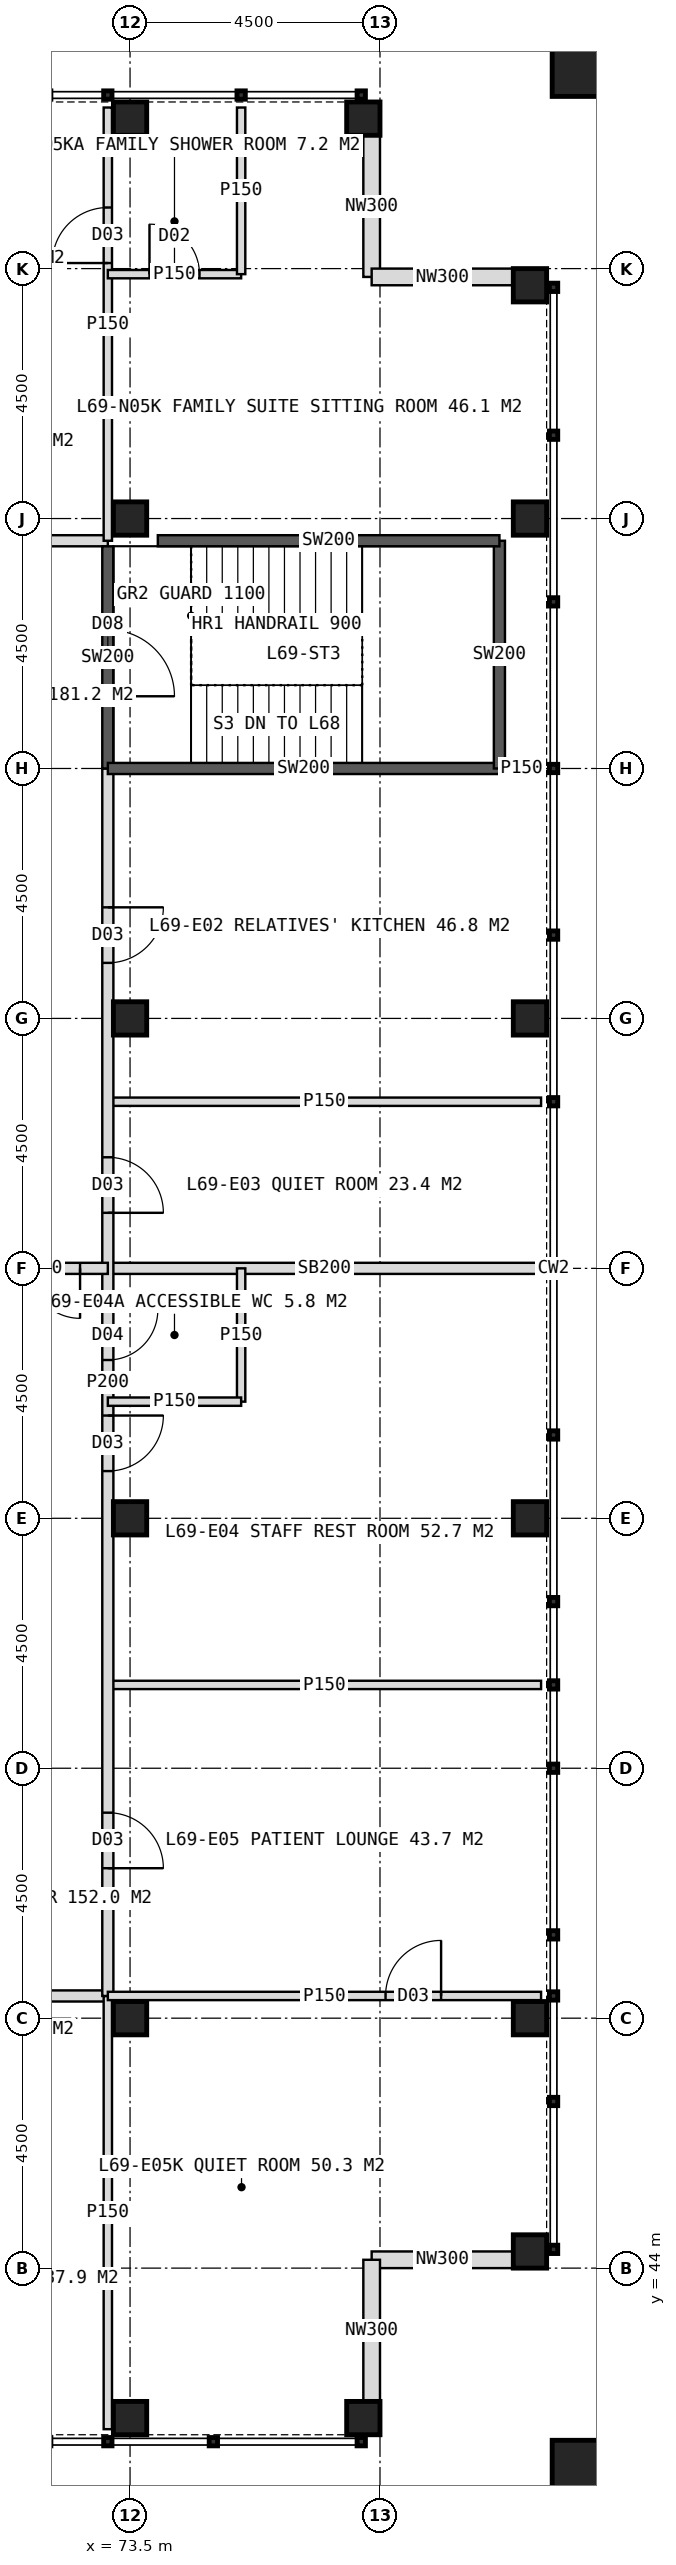
"""IFC4 building model, lengths in metres.
Left out: names, types, materials, properties, quantities, classifications, styles, units other than length and angle.
Written with IfcOpenShell. Run it as: python <this file> out.ifc"""

import sys

from ifc_helpers import new_model, si_unit, direction, frame, frame_2d, origin, origin_2d, place, context, subcontext, project, spatial, rectangle, hollow_rectangle, extrude, element, fill, save


model = new_model("IFC4")
c1 = context("Model", 3, precision=1e-05, world=origin(), true_north=direction((0.0, 1.0)))
c2 = subcontext(c1, "Body", "Model", "MODEL_VIEW")
j1 = project(units=[si_unit("LENGTHUNIT", "METRE"), si_unit("PLANEANGLEUNIT", "RADIAN")], contexts=[c1])
p1 = place(None, origin())
s1 = spatial("IfcSite", under=j1, at=p1, CompositionType="ELEMENT")
p2 = place(p1, origin())
s2 = spatial("IfcBuilding", under=s1, at=p2, CompositionType="ELEMENT")
p3 = place(p2, frame((0.0, 0.0, 286.0)))
s3 = spatial("IfcBuildingStorey", under=s2, at=p3, CompositionType="ELEMENT", Elevation=286.0)
for number, where, z_axis, x_axis in (
    (1, (73.5, 48.5, 0.0), (0.0, 0.0, 1.0), (1.0, 0.0, 0.0)),
    (2, (73.5, 75.5, 0.0), (0.0, 0.0, 1.0), (1.0, 0.0, 0.0)),
    (3, (73.5, 57.5, 0.0), (0.0, 0.0, 1.0), (1.0, 0.0, 0.0)),
    (4, (73.5, 66.5, 0.0), (0.0, 0.0, 1.0), (1.0, 0.0, 0.0)),
    (5, (80.7, 44.3, 0.0), (0.0, 0.0, 1.0), (1.0, 0.0, 0.0)),
    (6, (80.7, 48.5, 0.0), (0.0, 0.0, 1.0), (1.0, 0.0, 0.0)),
    (7, (80.7, 57.5, 0.0), (0.0, 0.0, 1.0), (1.0, 0.0, 0.0)),
    (8, (80.7, 66.5, 0.0), (0.0, 0.0, 1.0), (1.0, 0.0, 0.0)),
    (9, (73.5, 41.3, 0.0), (0.0, 0.0, 1.0), (1.0, 0.0, 0.0)),
    (10, (73.5, 82.7, 0.0), (0.0, 0.0, 1.0), (1.0, 0.0, 0.0)),
    (11, (80.7, 75.5, 0.0), (0.0, 0.0, 1.0), (1.0, 0.0, 0.0)),
    (12, (77.7, 41.3, 0.0), (0.0, 0.0, 1.0), (1.0, 0.0, 0.0)),
    (13, (77.7, 82.7, 0.0), (0.0, 0.0, 1.0), (1.0, 0.0, 0.0)),
    (14, (80.7, 79.7, 0.0), (0.0, 0.0, 1.0), (1.0, 0.0, 0.0)),
):
    element("IfcColumn", number, at=place(p3, frame(where, z_axis=z_axis, x_axis=x_axis)), inside=s3, PredefinedType="COLUMN", context=c2, shape_type="SweptSolid", body=[
        extrude(hollow_rectangle(XDim=0.6, YDim=0.6, WallThickness=0.04, at=origin_2d()), origin(), (0.0, 0.0, 1.0), 4.0),
    ])
for number, where, z_axis, x_axis in (
    (15, (81.6, 40.4, 0.0), (0.0, 0.0, 1.0), (1.0, 0.0, 0.0)),
    (16, (81.6, 83.6, 0.0), (0.0, 0.0, 1.0), (1.0, 0.0, 0.0)),
):
    element("IfcColumn", number, at=place(p3, frame(where, z_axis=z_axis, x_axis=x_axis)), inside=s3, PredefinedType="COLUMN", context=c2, shape_type="SweptSolid", body=[
        extrude(hollow_rectangle(XDim=1.0, YDim=1.0, WallThickness=0.06, at=origin_2d()), origin(), (0.0, 0.0, 1.0), 4.0),
    ])
for number, where, z_axis, x_axis in (
    (17, (77.85, 82.4, 0.0), (0.0, 0.0, 1.0), (0.0, -1.0, 0.0)),
    (18, (77.85, 79.85, 0.0), (0.0, 0.0, 1.0), (1.0, 0.0, 0.0)),
    (19, (80.4, 44.15, 0.0), (0.0, 0.0, 1.0), (-1.0, 0.0, 0.0)),
    (20, (77.85, 44.15, 0.0), (0.0, 0.0, 1.0), (0.0, -1.0, 0.0)),
):
    element("IfcWall", number, at=place(p3, frame(where, z_axis=z_axis, x_axis=x_axis)), inside=s3, PredefinedType="ELEMENTEDWALL", context=c2, shape_type="SweptSolid", body=[
        extrude(rectangle(XDim=2.55, YDim=0.3, at=frame_2d((1.275, 0.0))), origin(), (0.0, 0.0, 1.0), 2.95),
    ])
p4 = place(p3, frame((46.9, 75.1, 0.0), z_axis=(0.0, 0.0, 1.0), x_axis=(1.0, 0.0, 0.0)))
e21 = element("IfcWall", 21, at=p4, inside=s3, PredefinedType="PARTITIONING", context=c2, shape_type="SweptSolid", body=[
    extrude(rectangle(XDim=26.2, YDim=0.2, at=frame_2d((13.1, 0.0))), origin(), (0.0, 0.0, 1.0), 3.75),
])
p5 = place(p4, frame((1.55, 0.0, 0.0)))
e22 = element("IfcOpeningElement", 22, at=p5, cuts=e21, PredefinedType="OPENING", context=c2, shape_type="SweptSolid", body=[
    extrude(rectangle(XDim=1.0, YDim=2.1, at=frame_2d((0.5, 1.05))), frame((0.0, 0.11, 0.0), z_axis=(0.0, -1.0, 0.0), x_axis=(1.0, 0.0, 0.0)), (0.0, 0.0, 1.0), 0.22),
])
p6 = place(p4, frame((6.75, 0.0, 0.0)))
e23 = element("IfcOpeningElement", 23, at=p6, cuts=e21, PredefinedType="OPENING", context=c2, shape_type="SweptSolid", body=[
    extrude(rectangle(XDim=1.0, YDim=2.1, at=frame_2d((0.5, 1.05))), frame((0.0, 0.11, 0.0), z_axis=(0.0, -1.0, 0.0), x_axis=(1.0, 0.0, 0.0)), (0.0, 0.0, 1.0), 0.22),
])
p7 = place(p4, frame((14.25, 0.0, 0.0)))
e24 = element("IfcOpeningElement", 24, at=p7, cuts=e21, PredefinedType="OPENING", context=c2, shape_type="SweptSolid", body=[
    extrude(rectangle(XDim=1.2, YDim=2.2, at=frame_2d((0.6, 1.1))), frame((0.0, 0.11, 0.0), z_axis=(0.0, -1.0, 0.0), x_axis=(1.0, 0.0, 0.0)), (0.0, 0.0, 1.0), 0.22),
])
p8 = place(p4, frame((18.45, 0.0, 0.0)))
e25 = element("IfcOpeningElement", 25, at=p8, cuts=e21, PredefinedType="OPENING", context=c2, shape_type="SweptSolid", body=[
    extrude(rectangle(XDim=1.0, YDim=2.1, at=frame_2d((0.5, 1.05))), frame((0.0, 0.11, 0.0), z_axis=(0.0, -1.0, 0.0), x_axis=(1.0, 0.0, 0.0)), (0.0, 0.0, 1.0), 0.22),
])
p9 = place(p4, frame((23.25, 0.0, 0.0)))
e26 = element("IfcOpeningElement", 26, at=p9, cuts=e21, PredefinedType="OPENING", context=c2, shape_type="SweptSolid", body=[
    extrude(rectangle(XDim=1.2, YDim=2.2, at=frame_2d((0.6, 1.1))), frame((0.0, 0.11, 0.0), z_axis=(0.0, -1.0, 0.0), x_axis=(1.0, 0.0, 0.0)), (0.0, 0.0, 1.0), 0.22),
])
p10 = place(p3, frame((73.1, 75.1, 0.0), z_axis=(0.0, 0.0, 1.0), x_axis=(0.0, 1.0, 0.0)))
e27 = element("IfcWall", 27, at=p10, inside=s3, PredefinedType="PARTITIONING", context=c2, shape_type="SweptSolid", body=[
    extrude(rectangle(XDim=7.8, YDim=0.15, at=frame_2d((3.9, 0.0))), origin(), (0.0, 0.0, 1.0), 3.75),
])
p11 = place(p10, frame((5.0, 0.0, 0.0)))
e28 = element("IfcOpeningElement", 28, at=p11, cuts=e27, PredefinedType="OPENING", context=c2, shape_type="SweptSolid", body=[
    extrude(rectangle(XDim=1.0, YDim=2.1, at=frame_2d((0.5, 1.05))), frame((0.0, 0.085, 0.0), z_axis=(0.0, -1.0, 0.0), x_axis=(1.0, 0.0, 0.0)), (0.0, 0.0, 1.0), 0.17),
])
p12 = place(p3, frame((73.1, 79.9, 0.0), z_axis=(0.0, 0.0, 1.0), x_axis=(1.0, 0.0, 0.0)))
e29 = element("IfcWall", 29, at=p12, inside=s3, PredefinedType="PARTITIONING", context=c2, shape_type="SweptSolid", body=[
    extrude(rectangle(XDim=2.4, YDim=0.15, at=frame_2d((1.2, 0.0))), origin(), (0.0, 0.0, 1.0), 3.75),
])
p13 = place(p12, frame((0.75, 0.0, 0.0)))
e30 = element("IfcOpeningElement", 30, at=p13, cuts=e29, PredefinedType="OPENING", context=c2, shape_type="SweptSolid", body=[
    extrude(rectangle(XDim=0.9, YDim=2.1, at=frame_2d((0.45, 1.05))), frame((0.0, 0.085, 0.0), z_axis=(0.0, -1.0, 0.0), x_axis=(1.0, 0.0, 0.0)), (0.0, 0.0, 1.0), 0.17),
])
p14 = place(p3, frame((75.5, 79.9, 0.0), z_axis=(0.0, 0.0, 1.0), x_axis=(0.0, 1.0, 0.0)))
e31 = element("IfcWall", 31, at=p14, inside=s3, PredefinedType="PARTITIONING", context=c2, shape_type="SweptSolid", body=[
    extrude(rectangle(XDim=3.0, YDim=0.15, at=frame_2d((1.5, 0.0))), origin(), (0.0, 0.0, 1.0), 3.75),
])
p15 = place(p3, frame((73.1, 48.9, 0.0), z_axis=(0.0, 0.0, 1.0), x_axis=(-1.0, 0.0, 0.0)))
e32 = element("IfcWall", 32, at=p15, inside=s3, PredefinedType="PARTITIONING", context=c2, shape_type="SweptSolid", body=[
    extrude(rectangle(XDim=26.2, YDim=0.2, at=frame_2d((13.1, 0.0))), origin(), (0.0, 0.0, 1.0), 3.75),
])
p16 = place(p15, frame((1.75, 0.0, 0.0)))
e33 = element("IfcOpeningElement", 33, at=p16, cuts=e32, PredefinedType="OPENING", context=c2, shape_type="SweptSolid", body=[
    extrude(rectangle(XDim=1.2, YDim=2.2, at=frame_2d((0.6, 1.1))), frame((0.0, 0.11, 0.0), z_axis=(0.0, -1.0, 0.0), x_axis=(1.0, 0.0, 0.0)), (0.0, 0.0, 1.0), 0.22),
])
p17 = place(p15, frame((6.75, 0.0, 0.0)))
e34 = element("IfcOpeningElement", 34, at=p17, cuts=e32, PredefinedType="OPENING", context=c2, shape_type="SweptSolid", body=[
    extrude(rectangle(XDim=1.0, YDim=2.1, at=frame_2d((0.5, 1.05))), frame((0.0, 0.11, 0.0), z_axis=(0.0, -1.0, 0.0), x_axis=(1.0, 0.0, 0.0)), (0.0, 0.0, 1.0), 0.22),
])
p18 = place(p15, frame((11.85, 0.0, 0.0)))
e35 = element("IfcOpeningElement", 35, at=p18, cuts=e32, PredefinedType="OPENING", context=c2, shape_type="SweptSolid", body=[
    extrude(rectangle(XDim=1.0, YDim=2.1, at=frame_2d((0.5, 1.05))), frame((0.0, 0.11, 0.0), z_axis=(0.0, -1.0, 0.0), x_axis=(1.0, 0.0, 0.0)), (0.0, 0.0, 1.0), 0.22),
])
p19 = place(p15, frame((15.75, 0.0, 0.0)))
e36 = element("IfcOpeningElement", 36, at=p19, cuts=e32, PredefinedType="OPENING", context=c2, shape_type="SweptSolid", body=[
    extrude(rectangle(XDim=1.0, YDim=2.1, at=frame_2d((0.5, 1.05))), frame((0.0, 0.11, 0.0), z_axis=(0.0, -1.0, 0.0), x_axis=(1.0, 0.0, 0.0)), (0.0, 0.0, 1.0), 0.22),
])
p20 = place(p15, frame((23.25, 0.0, 0.0)))
e37 = element("IfcOpeningElement", 37, at=p20, cuts=e32, PredefinedType="OPENING", context=c2, shape_type="SweptSolid", body=[
    extrude(rectangle(XDim=1.2, YDim=2.2, at=frame_2d((0.6, 1.1))), frame((0.0, 0.11, 0.0), z_axis=(0.0, -1.0, 0.0), x_axis=(1.0, 0.0, 0.0)), (0.0, 0.0, 1.0), 0.22),
])
p21 = place(p3, frame((73.1, 48.9, 0.0), z_axis=(0.0, 0.0, 1.0), x_axis=(0.0, -1.0, 0.0)))
e38 = element("IfcWall", 38, at=p21, inside=s3, PredefinedType="PARTITIONING", context=c2, shape_type="SweptSolid", body=[
    extrude(rectangle(XDim=7.8, YDim=0.15, at=frame_2d((3.9, 0.0))), origin(), (0.0, 0.0, 1.0), 3.75),
])
p22 = place(p3, frame((80.2, 71.0, 0.0), z_axis=(0.0, 0.0, 1.0), x_axis=(1.0, 0.0, 0.0)))
e39 = element("IfcWall", 39, at=p22, inside=s3, PredefinedType="PARTITIONING", context=c2, shape_type="SweptSolid", body=[
    extrude(rectangle(XDim=0.7, YDim=0.15, at=frame_2d((0.35, 0.0))), origin(), (0.0, 0.0, 1.0), 3.75),
])
p23 = place(p3, frame((73.1, 65.0, 0.0), z_axis=(0.0, 0.0, 1.0), x_axis=(1.0, 0.0, 0.0)))
e40 = element("IfcWall", 40, at=p23, inside=s3, PredefinedType="PARTITIONING", context=c2, shape_type="SweptSolid", body=[
    extrude(rectangle(XDim=7.8, YDim=0.15, at=frame_2d((3.9, 0.0))), origin(), (0.0, 0.0, 1.0), 3.75),
])
p24 = place(p3, frame((73.1, 62.0, 0.0), z_axis=(0.0, 0.0, 1.0), x_axis=(1.0, 0.0, 0.0)))
e41 = element("IfcWall", 41, at=p24, inside=s3, PredefinedType="SOLIDWALL", context=c2, shape_type="SweptSolid", body=[
    extrude(rectangle(XDim=7.8, YDim=0.2, at=frame_2d((3.9, 0.0))), origin(), (0.0, 0.0, 1.0), 2.997),
])
p25 = place(p3, frame((73.1, 54.5, 0.0), z_axis=(0.0, 0.0, 1.0), x_axis=(1.0, 0.0, 0.0)))
e42 = element("IfcWall", 42, at=p25, inside=s3, PredefinedType="PARTITIONING", context=c2, shape_type="SweptSolid", body=[
    extrude(rectangle(XDim=7.8, YDim=0.15, at=frame_2d((3.9, 0.0))), origin(), (0.0, 0.0, 1.0), 3.75),
])
p26 = place(p3, frame((73.1, 71.0, 0.0), z_axis=(0.0, 0.0, 1.0), x_axis=(0.0, -1.0, 0.0)))
e43 = element("IfcWall", 43, at=p26, inside=s3, PredefinedType="PARTITIONING", context=c2, shape_type="SweptSolid", body=[
    extrude(rectangle(XDim=22.1, YDim=0.2, at=frame_2d((11.05, 0.0))), origin(), (0.0, 0.0, 1.0), 3.75),
])
p27 = place(p26, frame((2.5, 0.0, 0.0)))
e44 = element("IfcOpeningElement", 44, at=p27, cuts=e43, PredefinedType="OPENING", context=c2, shape_type="SweptSolid", body=[
    extrude(rectangle(XDim=1.0, YDim=2.1, at=frame_2d((0.5, 1.05))), frame((0.0, 0.11, 0.0), z_axis=(0.0, -1.0, 0.0), x_axis=(1.0, 0.0, 0.0)), (0.0, 0.0, 1.0), 0.22),
])
p28 = place(p26, frame((7.0, 0.0, 0.0)))
e45 = element("IfcOpeningElement", 45, at=p28, cuts=e43, PredefinedType="OPENING", context=c2, shape_type="SweptSolid", body=[
    extrude(rectangle(XDim=1.0, YDim=2.1, at=frame_2d((0.5, 1.05))), frame((0.0, 0.11, 0.0), z_axis=(0.0, -1.0, 0.0), x_axis=(1.0, 0.0, 0.0)), (0.0, 0.0, 1.0), 0.22),
])
p29 = place(p26, frame((9.75, 0.0, 0.0)))
e46 = element("IfcOpeningElement", 46, at=p29, cuts=e43, PredefinedType="OPENING", context=c2, shape_type="SweptSolid", body=[
    extrude(rectangle(XDim=0.9, YDim=2.1, at=frame_2d((0.45, 1.05))), frame((0.0, 0.11, 0.0), z_axis=(0.0, -1.0, 0.0), x_axis=(1.0, 0.0, 0.0)), (0.0, 0.0, 1.0), 0.22),
])
p30 = place(p26, frame((11.65, 0.0, 0.0)))
e47 = element("IfcOpeningElement", 47, at=p30, cuts=e43, PredefinedType="OPENING", context=c2, shape_type="SweptSolid", body=[
    extrude(rectangle(XDim=1.0, YDim=2.1, at=frame_2d((0.5, 1.05))), frame((0.0, 0.11, 0.0), z_axis=(0.0, -1.0, 0.0), x_axis=(1.0, 0.0, 0.0)), (0.0, 0.0, 1.0), 0.22),
])
p31 = place(p26, frame((18.8, 0.0, 0.0)))
e48 = element("IfcOpeningElement", 48, at=p31, cuts=e43, PredefinedType="OPENING", context=c2, shape_type="SweptSolid", body=[
    extrude(rectangle(XDim=1.0, YDim=2.1, at=frame_2d((0.5, 1.05))), frame((0.0, 0.11, 0.0), z_axis=(0.0, -1.0, 0.0), x_axis=(1.0, 0.0, 0.0)), (0.0, 0.0, 1.0), 0.22),
])
for number, where, z_axis, x_axis in (
    (49, (75.5, 62.0, 0.0), (0.0, 0.0, 1.0), (0.0, -1.0, 0.0)),
    (50, (73.1, 59.6, 0.0), (0.0, 0.0, 1.0), (1.0, 0.0, 0.0)),
):
    element("IfcWall", number, at=place(p3, frame(where, z_axis=z_axis, x_axis=x_axis)), inside=s3, PredefinedType="PARTITIONING", context=c2, shape_type="SweptSolid", body=[
        extrude(rectangle(XDim=2.4, YDim=0.15, at=frame_2d((1.2, 0.0))), origin(), (0.0, 0.0, 1.0), 3.75),
    ])
p32 = place(p3, frame((73.1, 48.9, 0.0), z_axis=(0.0, 0.0, 1.0), x_axis=(1.0, 0.0, 0.0)))
e51 = element("IfcWall", 51, at=p32, inside=s3, PredefinedType="PARTITIONING", context=c2, shape_type="SweptSolid", body=[
    extrude(rectangle(XDim=7.8, YDim=0.15, at=frame_2d((3.9, 0.0))), origin(), (0.0, 0.0, 1.0), 3.75),
])
p33 = place(p32, frame((5.0, 0.0, 0.0)))
e52 = element("IfcOpeningElement", 52, at=p33, cuts=e51, PredefinedType="OPENING", context=c2, shape_type="SweptSolid", body=[
    extrude(rectangle(XDim=1.0, YDim=2.1, at=frame_2d((0.5, 1.05))), frame((0.0, 0.085, 0.0), z_axis=(0.0, -1.0, 0.0), x_axis=(1.0, 0.0, 0.0)), (0.0, 0.0, 1.0), 0.17),
])
p34 = place(p3, frame((70.5, 62.0, 0.0), z_axis=(0.0, 0.0, 1.0), x_axis=(1.0, 0.0, 0.0)))
e53 = element("IfcWall", 53, at=p34, inside=s3, PredefinedType="SOLIDWALL", context=c2, shape_type="SweptSolid", body=[
    extrude(rectangle(XDim=2.6, YDim=0.2, at=frame_2d((1.3, 0.0))), origin(), (0.0, 0.0, 1.0), 2.997),
])
p35 = place(p34, frame((0.3, 0.0, 0.0)))
e54 = element("IfcOpeningElement", 54, at=p35, cuts=e53, PredefinedType="OPENING", context=c2, shape_type="SweptSolid", body=[
    extrude(rectangle(XDim=1.8, YDim=2.2, at=frame_2d((0.9, 1.1))), frame((0.0, 0.11, 0.0), z_axis=(0.0, -1.0, 0.0), x_axis=(1.0, 0.0, 0.0)), (0.0, 0.0, 1.0), 0.22),
])
p36 = place(p3, frame((73.1, 75.0, 0.0), z_axis=(0.0, 0.0, 1.0), x_axis=(0.0, -1.0, 0.0)))
e55 = element("IfcWall", 55, at=p36, inside=s3, PredefinedType="SOLIDWALL", context=c2, shape_type="SweptSolid", body=[
    extrude(rectangle(XDim=4.0, YDim=0.2, at=frame_2d((2.0, 0.0))), origin(), (0.0, 0.0, 1.0), 3.75),
])
p37 = place(p36, frame((1.5, 0.0, 0.0)))
e56 = element("IfcOpeningElement", 56, at=p37, cuts=e55, PredefinedType="OPENING", context=c2, shape_type="SweptSolid", body=[
    extrude(rectangle(XDim=1.2, YDim=2.1, at=frame_2d((0.6, 1.05))), frame((0.0, 0.11, 0.0), z_axis=(0.0, -1.0, 0.0), x_axis=(1.0, 0.0, 0.0)), (0.0, 0.0, 1.0), 0.22),
])
p38 = place(p3, frame((73.1, 71.0, 0.0), z_axis=(0.0, 0.0, 1.0), x_axis=(1.0, 0.0, 0.0)))
e57 = element("IfcWall", 57, at=p38, inside=s3, PredefinedType="SOLIDWALL", context=c2, shape_type="SweptSolid", body=[
    extrude(rectangle(XDim=7.05, YDim=0.2, at=frame_2d((3.525, 0.0))), origin(), (0.0, 0.0, 1.0), 3.75),
])
p39 = place(p3, frame((80.15, 71.0, 0.0), z_axis=(0.0, 0.0, 1.0), x_axis=(0.0, 1.0, 0.0)))
e58 = element("IfcWall", 58, at=p39, inside=s3, PredefinedType="SOLIDWALL", context=c2, shape_type="SweptSolid", body=[
    extrude(rectangle(XDim=4.1, YDim=0.2, at=frame_2d((2.05, 0.0))), origin(), (0.0, 0.0, 1.0), 3.75),
])
p40 = place(p3, frame((74.0, 75.1, 0.0), z_axis=(0.0, 0.0, 1.0), x_axis=(1.0, 0.0, 0.0)))
e59 = element("IfcWall", 59, at=p40, inside=s3, PredefinedType="SOLIDWALL", context=c2, shape_type="SweptSolid", body=[
    extrude(rectangle(XDim=6.15, YDim=0.2, at=frame_2d((3.075, 0.0))), origin(), (0.0, 0.0, 1.0), 3.75),
])
p41 = place(p13, origin())
e60 = element("IfcDoor", 60, at=p41, inside=s3, OperationType="SINGLE_SWING_LEFT", PredefinedType="DOOR", context=c2, shape_type="SweptSolid", body=[
    extrude(rectangle(XDim=0.9, YDim=2.1, at=frame_2d((0.45, 1.05))), frame((0.0, 0.025, 0.0), z_axis=(0.0, -1.0, 0.0), x_axis=(1.0, 0.0, 0.0)), (0.0, 0.0, 1.0), 0.05),
])
fill(e30, e60)
p42 = place(p11, origin())
e61 = element("IfcDoor", 61, at=p42, inside=s3, OperationType="SINGLE_SWING_LEFT", PredefinedType="DOOR", context=c2, shape_type="SweptSolid", body=[
    extrude(rectangle(XDim=1.0, YDim=2.1, at=frame_2d((0.5, 1.05))), frame((0.0, 0.025, 0.0), z_axis=(0.0, -1.0, 0.0), x_axis=(1.0, 0.0, 0.0)), (0.0, 0.0, 1.0), 0.05),
])
fill(e28, e61)
p43 = place(p27, origin())
e62 = element("IfcDoor", 62, at=p43, inside=s3, OperationType="SINGLE_SWING_LEFT", PredefinedType="DOOR", context=c2, shape_type="SweptSolid", body=[
    extrude(rectangle(XDim=1.0, YDim=2.1, at=frame_2d((0.5, 1.05))), frame((0.0, 0.025, 0.0), z_axis=(0.0, -1.0, 0.0), x_axis=(1.0, 0.0, 0.0)), (0.0, 0.0, 1.0), 0.05),
])
fill(e44, e62)
p44 = place(p28, origin())
e63 = element("IfcDoor", 63, at=p44, inside=s3, OperationType="SINGLE_SWING_RIGHT", PredefinedType="DOOR", context=c2, shape_type="SweptSolid", body=[
    extrude(rectangle(XDim=1.0, YDim=2.1, at=frame_2d((0.5, 1.05))), frame((0.0, 0.025, 0.0), z_axis=(0.0, -1.0, 0.0), x_axis=(1.0, 0.0, 0.0)), (0.0, 0.0, 1.0), 0.05),
])
fill(e45, e63)
p45 = place(p29, origin())
e64 = element("IfcDoor", 64, at=p45, inside=s3, OperationType="SINGLE_SWING_LEFT", PredefinedType="DOOR", context=c2, shape_type="SweptSolid", body=[
    extrude(rectangle(XDim=0.9, YDim=2.1, at=frame_2d((0.45, 1.05))), frame((0.0, 0.025, 0.0), z_axis=(0.0, -1.0, 0.0), x_axis=(1.0, 0.0, 0.0)), (0.0, 0.0, 1.0), 0.05),
])
fill(e46, e64)
p46 = place(p30, origin())
e65 = element("IfcDoor", 65, at=p46, inside=s3, OperationType="SINGLE_SWING_LEFT", PredefinedType="DOOR", context=c2, shape_type="SweptSolid", body=[
    extrude(rectangle(XDim=1.0, YDim=2.1, at=frame_2d((0.5, 1.05))), frame((0.0, 0.025, 0.0), z_axis=(0.0, -1.0, 0.0), x_axis=(1.0, 0.0, 0.0)), (0.0, 0.0, 1.0), 0.05),
])
fill(e47, e65)
p47 = place(p33, origin())
e66 = element("IfcDoor", 66, at=p47, inside=s3, OperationType="SINGLE_SWING_RIGHT", PredefinedType="DOOR", context=c2, shape_type="SweptSolid", body=[
    extrude(rectangle(XDim=1.0, YDim=2.1, at=frame_2d((0.5, 1.05))), frame((0.0, 0.025, 0.0), z_axis=(0.0, -1.0, 0.0), x_axis=(1.0, 0.0, 0.0)), (0.0, 0.0, 1.0), 0.05),
])
fill(e52, e66)
p48 = place(p31, origin())
e67 = element("IfcDoor", 67, at=p48, inside=s3, OperationType="SINGLE_SWING_RIGHT", PredefinedType="DOOR", context=c2, shape_type="SweptSolid", body=[
    extrude(rectangle(XDim=1.0, YDim=2.1, at=frame_2d((0.5, 1.05))), frame((0.0, 0.025, 0.0), z_axis=(0.0, -1.0, 0.0), x_axis=(1.0, 0.0, 0.0)), (0.0, 0.0, 1.0), 0.05),
])
fill(e48, e67)
p49 = place(p35, origin())
e68 = element("IfcDoor", 68, at=p49, inside=s3, OperationType="DOUBLE_DOOR_DOUBLE_SWING", PredefinedType="DOOR", context=c2, shape_type="SweptSolid", body=[
    extrude(rectangle(XDim=1.8, YDim=2.2, at=frame_2d((0.9, 1.1))), frame((0.0, 0.025, 0.0), z_axis=(0.0, -1.0, 0.0), x_axis=(1.0, 0.0, 0.0)), (0.0, 0.0, 1.0), 0.05),
])
fill(e54, e68)
p50 = place(p37, origin())
e69 = element("IfcDoor", 69, at=p50, inside=s3, OperationType="SINGLE_SWING_RIGHT", PredefinedType="DOOR", context=c2, shape_type="SweptSolid", body=[
    extrude(rectangle(XDim=1.2, YDim=2.1, at=frame_2d((0.6, 1.05))), frame((0.0, 0.025, 0.0), z_axis=(0.0, -1.0, 0.0), x_axis=(1.0, 0.0, 0.0)), (0.0, 0.0, 1.0), 0.05),
])
fill(e56, e69)
save(model, sys.argv[1])
